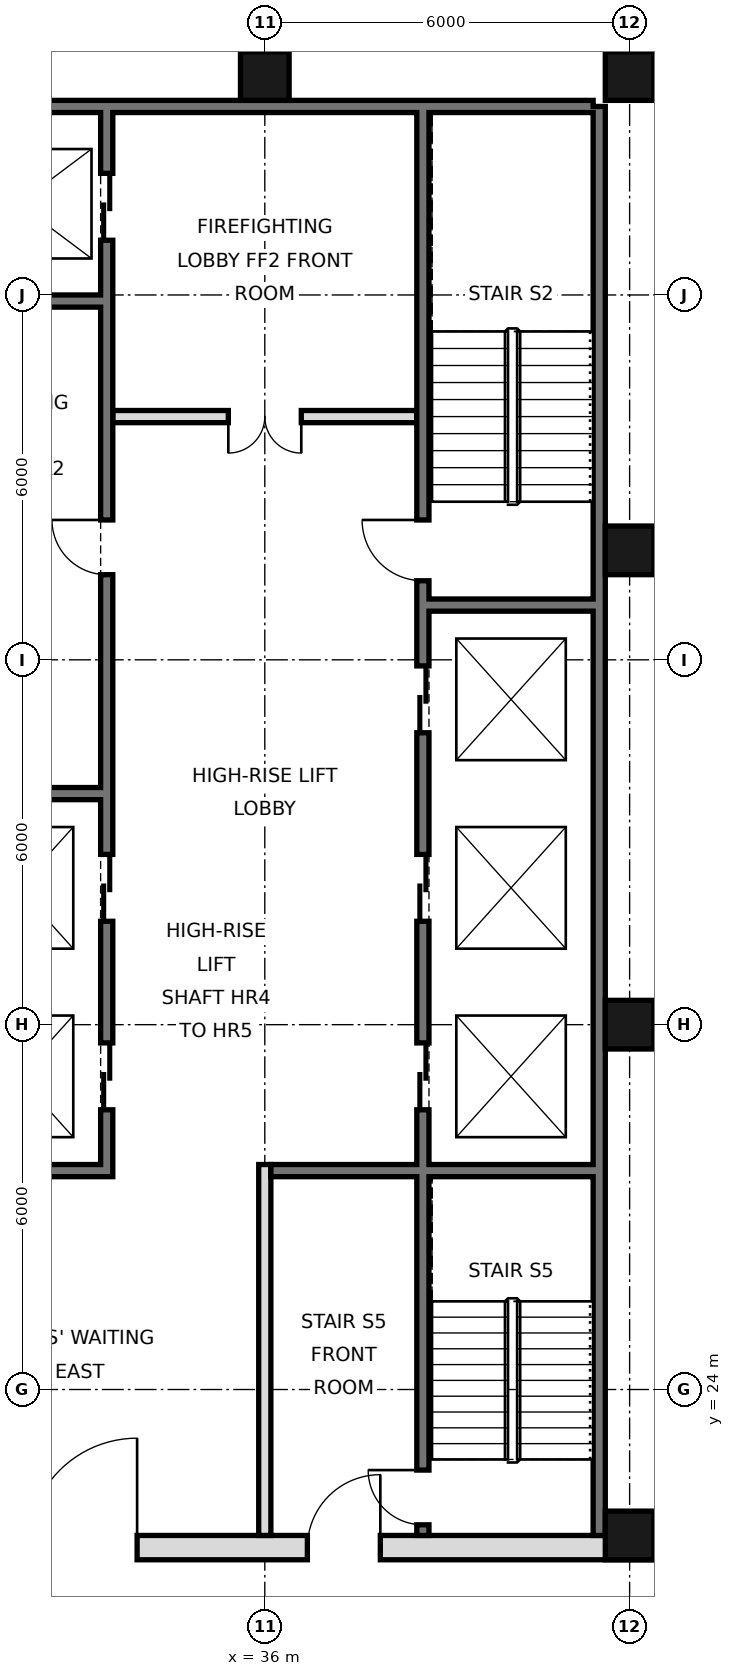
"""IFC4 building model, lengths in metres.
Left out: names, types, materials, properties, quantities, classifications, styles, units other than length and angle.
Written with IfcOpenShell. Run it as: python <this file> out.ifc"""

import sys

from ifc_helpers import new_model, si_unit, direction, frame, frame_2d, origin, origin_2d, place, context, subcontext, project, spatial, rectangle, hollow_rectangle, extrude, element, fill, save


model = new_model("IFC4")
c1 = context("Model", 3, precision=1e-05, world=origin(), true_north=direction((0.0, 1.0)))
c2 = subcontext(c1, "Body", "Model", "MODEL_VIEW")
j1 = project(units=[si_unit("LENGTHUNIT", "METRE"), si_unit("PLANEANGLEUNIT", "RADIAN")], contexts=[c1])
p1 = place(None, origin())
s1 = spatial("IfcSite", under=j1, at=p1, CompositionType="ELEMENT")
p2 = place(p1, origin())
s2 = spatial("IfcBuilding", under=s1, at=p2, CompositionType="ELEMENT")
p3 = place(p2, frame((0.0, 0.0, 266.6)))
s3 = spatial("IfcBuildingStorey", under=s2, at=p3, CompositionType="ELEMENT", Elevation=266.6)
for number, where, z_axis, x_axis in (
    (1, (36.0, 45.6, 0.0), (0.0, 0.0, 1.0), (1.0, 0.0, 0.0)),
    (2, (42.0, 21.6, 0.0), (0.0, 0.0, 1.0), (1.0, 0.0, 0.0)),
    (3, (42.0, 30.0, 0.0), (0.0, 0.0, 1.0), (1.0, 0.0, 0.0)),
    (4, (42.0, 37.8, 0.0), (0.0, 0.0, 1.0), (1.0, 0.0, 0.0)),
    (5, (42.0, 45.6, 0.0), (0.0, 0.0, 1.0), (1.0, 0.0, 0.0)),
):
    element("IfcColumn", number, at=place(p3, frame(where, z_axis=z_axis, x_axis=x_axis)), inside=s3, PredefinedType="COLUMN", context=c2, shape_type="SweptSolid", body=[
        extrude(hollow_rectangle(XDim=0.8, YDim=0.8, WallThickness=0.032, at=origin_2d()), origin(), (0.0, 0.0, 1.0), 3.6),
    ])
p4 = place(p3, frame((41.5, 21.6, 0.0), z_axis=(0.0, 0.0, 1.0), x_axis=(0.0, 1.0, 0.0)))
e6 = element("IfcWall", 6, at=p4, inside=s3, PredefinedType="SOLIDWALL", context=c2, shape_type="SweptSolid", body=[
    extrude(rectangle(XDim=23.5, YDim=0.2, at=frame_2d((11.75, 0.0))), origin(), (0.0, 0.0, 1.0), 3.42),
])
p5 = place(p3, frame((6.6, 45.1, 0.0), z_axis=(0.0, 0.0, 1.0), x_axis=(1.0, 0.0, 0.0)))
e7 = element("IfcWall", 7, at=p5, inside=s3, PredefinedType="SOLIDWALL", context=c2, shape_type="SweptSolid", body=[
    extrude(rectangle(XDim=34.8, YDim=0.2, at=frame_2d((17.4, 0.0))), origin(), (0.0, 0.0, 1.0), 3.42),
])
p6 = place(p3, frame((5.6, 21.4, 0.0), z_axis=(0.0, 0.0, 1.0), x_axis=(1.0, 0.0, 0.0)))
e8 = element("IfcWall", 8, at=p6, inside=s3, PredefinedType="SOLIDWALL", context=c2, shape_type="SweptSolid", body=[
    extrude(rectangle(XDim=36.8, YDim=0.4, at=frame_2d((18.4, 0.0))), origin(), (0.0, 0.0, 1.0), 3.42),
])
p7 = place(p6, frame((8.5, 0.0, 0.0)))
e9 = element("IfcOpeningElement", 9, at=p7, cuts=e8, PredefinedType="OPENING", context=c2, shape_type="SweptSolid", body=[
    extrude(rectangle(XDim=1.8, YDim=2.1, at=frame_2d((0.9, 1.05))), frame((0.0, 0.21, 0.0), z_axis=(0.0, -1.0, 0.0), x_axis=(1.0, 0.0, 0.0)), (0.0, 0.0, 1.0), 0.42),
])
p8 = place(p6, frame((17.5, 0.0, 0.0)))
e10 = element("IfcOpeningElement", 10, at=p8, cuts=e8, PredefinedType="OPENING", context=c2, shape_type="SweptSolid", body=[
    extrude(rectangle(XDim=1.8, YDim=2.1, at=frame_2d((0.9, 1.05))), frame((0.0, 0.21, 0.0), z_axis=(0.0, -1.0, 0.0), x_axis=(1.0, 0.0, 0.0)), (0.0, 0.0, 1.0), 0.42),
])
p9 = place(p6, frame((26.5, 0.0, 0.0)))
e11 = element("IfcOpeningElement", 11, at=p9, cuts=e8, PredefinedType="OPENING", context=c2, shape_type="SweptSolid", body=[
    extrude(rectangle(XDim=1.8, YDim=2.1, at=frame_2d((0.9, 1.05))), frame((0.0, 0.21, 0.0), z_axis=(0.0, -1.0, 0.0), x_axis=(1.0, 0.0, 0.0)), (0.0, 0.0, 1.0), 0.42),
])
p10 = place(p6, frame((4.5, 0.0, 0.0)))
e12 = element("IfcOpeningElement", 12, at=p10, cuts=e8, PredefinedType="OPENING", context=c2, shape_type="SweptSolid", body=[
    extrude(rectangle(XDim=1.2, YDim=2.1, at=frame_2d((0.6, 1.05))), frame((0.0, 0.21, 0.0), z_axis=(0.0, -1.0, 0.0), x_axis=(1.0, 0.0, 0.0)), (0.0, 0.0, 1.0), 0.42),
])
p11 = place(p6, frame((31.1, 0.0, 0.0)))
e13 = element("IfcOpeningElement", 13, at=p11, cuts=e8, PredefinedType="OPENING", context=c2, shape_type="SweptSolid", body=[
    extrude(rectangle(XDim=1.2, YDim=2.1, at=frame_2d((0.6, 1.05))), frame((0.0, 0.21, 0.0), z_axis=(0.0, -1.0, 0.0), x_axis=(1.0, 0.0, 0.0)), (0.0, 0.0, 1.0), 0.42),
])
p12 = place(p3, frame((33.4, 27.5, 0.0), z_axis=(0.0, 0.0, 1.0), x_axis=(0.0, 1.0, 0.0)))
e14 = element("IfcWall", 14, at=p12, inside=s3, PredefinedType="SOLIDWALL", context=c2, shape_type="SweptSolid", body=[
    extrude(rectangle(XDim=17.5, YDim=0.2, at=frame_2d((8.75, 0.0))), origin(), (0.0, 0.0, 1.0), 3.42),
])
p13 = place(p12, frame((1.1, 0.0, 0.0)))
e15 = element("IfcOpeningElement", 15, at=p13, cuts=e14, PredefinedType="OPENING", context=c2, shape_type="SweptSolid", body=[
    extrude(rectangle(XDim=1.1, YDim=2.1, at=frame_2d((0.55, 1.05))), frame((0.0, 0.11, 0.0), z_axis=(0.0, -1.0, 0.0), x_axis=(1.0, 0.0, 0.0)), (0.0, 0.0, 1.0), 0.22),
])
p14 = place(p12, frame((4.2, 0.0, 0.0)))
e16 = element("IfcOpeningElement", 16, at=p14, cuts=e14, PredefinedType="OPENING", context=c2, shape_type="SweptSolid", body=[
    extrude(rectangle(XDim=1.1, YDim=2.1, at=frame_2d((0.55, 1.05))), frame((0.0, 0.11, 0.0), z_axis=(0.0, -1.0, 0.0), x_axis=(1.0, 0.0, 0.0)), (0.0, 0.0, 1.0), 0.22),
])
p15 = place(p12, frame((15.4, 0.0, 0.0)))
e17 = element("IfcOpeningElement", 17, at=p15, cuts=e14, PredefinedType="OPENING", context=c2, shape_type="SweptSolid", body=[
    extrude(rectangle(XDim=1.1, YDim=2.1, at=frame_2d((0.55, 1.05))), frame((0.0, 0.11, 0.0), z_axis=(0.0, -1.0, 0.0), x_axis=(1.0, 0.0, 0.0)), (0.0, 0.0, 1.0), 0.22),
])
p16 = place(p12, frame((9.9, 0.0, 0.0)))
e18 = element("IfcOpeningElement", 18, at=p16, cuts=e14, PredefinedType="OPENING", context=c2, shape_type="SweptSolid", body=[
    extrude(rectangle(XDim=0.9, YDim=2.1, at=frame_2d((0.45, 1.05))), frame((0.0, 0.11, 0.0), z_axis=(0.0, -1.0, 0.0), x_axis=(1.0, 0.0, 0.0)), (0.0, 0.0, 1.0), 0.22),
])
p17 = place(p3, frame((36.0, 21.6, 0.0), z_axis=(0.0, 0.0, 1.0), x_axis=(0.0, 1.0, 0.0)))
e19 = element("IfcWall", 19, at=p17, inside=s3, PredefinedType="PARTITIONING", context=c2, shape_type="SweptSolid", body=[
    extrude(rectangle(XDim=6.1, YDim=0.2, at=frame_2d((3.05, 0.0))), origin(), (0.0, 0.0, 1.0), 3.42),
])
p18 = place(p3, frame((38.6, 21.6, 0.0), z_axis=(0.0, 0.0, 1.0), x_axis=(0.0, 1.0, 0.0)))
e20 = element("IfcWall", 20, at=p18, inside=s3, PredefinedType="SOLIDWALL", context=c2, shape_type="SweptSolid", body=[
    extrude(rectangle(XDim=23.4, YDim=0.2, at=frame_2d((11.7, 0.0))), origin(), (0.0, 0.0, 1.0), 3.42),
])
p19 = place(p18, frame((7.0, 0.0, 0.0)))
e21 = element("IfcOpeningElement", 21, at=p19, cuts=e20, PredefinedType="OPENING", context=c2, shape_type="SweptSolid", body=[
    extrude(rectangle(XDim=1.1, YDim=2.1, at=frame_2d((0.55, 1.05))), frame((0.0, 0.11, 0.0), z_axis=(0.0, -1.0, 0.0), x_axis=(1.0, 0.0, 0.0)), (0.0, 0.0, 1.0), 0.22),
])
p20 = place(p18, frame((10.1, 0.0, 0.0)))
e22 = element("IfcOpeningElement", 22, at=p20, cuts=e20, PredefinedType="OPENING", context=c2, shape_type="SweptSolid", body=[
    extrude(rectangle(XDim=1.1, YDim=2.1, at=frame_2d((0.55, 1.05))), frame((0.0, 0.11, 0.0), z_axis=(0.0, -1.0, 0.0), x_axis=(1.0, 0.0, 0.0)), (0.0, 0.0, 1.0), 0.22),
])
p21 = place(p18, frame((13.2, 0.0, 0.0)))
e23 = element("IfcOpeningElement", 23, at=p21, cuts=e20, PredefinedType="OPENING", context=c2, shape_type="SweptSolid", body=[
    extrude(rectangle(XDim=1.1, YDim=2.1, at=frame_2d((0.55, 1.05))), frame((0.0, 0.11, 0.0), z_axis=(0.0, -1.0, 0.0), x_axis=(1.0, 0.0, 0.0)), (0.0, 0.0, 1.0), 0.22),
])
p22 = place(p18, frame((15.7, 0.0, 0.0)))
e24 = element("IfcOpeningElement", 24, at=p22, cuts=e20, PredefinedType="OPENING", context=c2, shape_type="SweptSolid", body=[
    extrude(rectangle(XDim=1.0, YDim=2.1, at=frame_2d((0.5, 1.05))), frame((0.0, 0.11, 0.0), z_axis=(0.0, -1.0, 0.0), x_axis=(1.0, 0.0, 0.0)), (0.0, 0.0, 1.0), 0.22),
])
p23 = place(p18, frame((0.175, 0.0, 0.0)))
e25 = element("IfcOpeningElement", 25, at=p23, cuts=e20, PredefinedType="OPENING", context=c2, shape_type="SweptSolid", body=[
    extrude(rectangle(XDim=0.9, YDim=2.1, at=frame_2d((0.45, 1.05))), frame((0.0, 0.11, 0.0), z_axis=(0.0, -1.0, 0.0), x_axis=(1.0, 0.0, 0.0)), (0.0, 0.0, 1.0), 0.22),
])
p24 = place(p3, frame((30.6, 27.6, 0.0), z_axis=(0.0, 0.0, 1.0), x_axis=(1.0, 0.0, 0.0)))
e26 = element("IfcWall", 26, at=p24, inside=s3, PredefinedType="SOLIDWALL", context=c2, shape_type="SweptSolid", body=[
    extrude(rectangle(XDim=2.7, YDim=0.2, at=frame_2d((1.35, 0.0))), origin(), (0.0, 0.0, 1.0), 3.42),
])
p25 = place(p3, frame((36.1, 27.6, 0.0), z_axis=(0.0, 0.0, 1.0), x_axis=(1.0, 0.0, 0.0)))
e27 = element("IfcWall", 27, at=p25, inside=s3, PredefinedType="SOLIDWALL", context=c2, shape_type="SweptSolid", body=[
    extrude(rectangle(XDim=5.3, YDim=0.2, at=frame_2d((2.65, 0.0))), origin(), (0.0, 0.0, 1.0), 3.42),
])
for number, where, z_axis, x_axis in (
    (28, (30.6, 33.8, 0.0), (0.0, 0.0, 1.0), (1.0, 0.0, 0.0)),
    (29, (38.7, 36.9, 0.0), (0.0, 0.0, 1.0), (1.0, 0.0, 0.0)),
):
    element("IfcWall", number, at=place(p3, frame(where, z_axis=z_axis, x_axis=x_axis)), inside=s3, PredefinedType="SOLIDWALL", context=c2, shape_type="SweptSolid", body=[
        extrude(rectangle(XDim=2.7, YDim=0.2, at=frame_2d((1.35, 0.0))), origin(), (0.0, 0.0, 1.0), 3.42),
    ])
p26 = place(p3, frame((33.5, 40.0, 0.0), z_axis=(0.0, 0.0, 1.0), x_axis=(1.0, 0.0, 0.0)))
e30 = element("IfcWall", 30, at=p26, inside=s3, PredefinedType="PARTITIONING", context=c2, shape_type="SweptSolid", body=[
    extrude(rectangle(XDim=5.0, YDim=0.2, at=frame_2d((2.5, 0.0))), origin(), (0.0, 0.0, 1.0), 3.42),
])
p27 = place(p26, frame((1.9, 0.0, 0.0)))
e31 = element("IfcOpeningElement", 31, at=p27, cuts=e30, PredefinedType="OPENING", context=c2, shape_type="SweptSolid", body=[
    extrude(rectangle(XDim=1.2, YDim=2.1, at=frame_2d((0.6, 1.05))), frame((0.0, 0.11, 0.0), z_axis=(0.0, -1.0, 0.0), x_axis=(1.0, 0.0, 0.0)), (0.0, 0.0, 1.0), 0.22),
])
p28 = place(p3, frame((30.6, 41.9, 0.0), z_axis=(0.0, 0.0, 1.0), x_axis=(1.0, 0.0, 0.0)))
e32 = element("IfcWall", 32, at=p28, inside=s3, PredefinedType="SOLIDWALL", context=c2, shape_type="SweptSolid", body=[
    extrude(rectangle(XDim=2.7, YDim=0.2, at=frame_2d((1.35, 0.0))), origin(), (0.0, 0.0, 1.0), 3.42),
])
p29 = place(p9, frame((1.8, 0.0, 0.0), z_axis=(0.0, 0.0, 1.0), x_axis=(-1.0, 0.0, 0.0)))
e33 = element("IfcDoor", 33, at=p29, inside=s3, OperationType="SINGLE_SWING_LEFT", PredefinedType="DOOR", context=c2, shape_type="SweptSolid", body=[
    extrude(rectangle(XDim=1.8, YDim=2.1, at=frame_2d((0.9, 1.05))), frame((0.0, 0.025, 0.0), z_axis=(0.0, -1.0, 0.0), x_axis=(1.0, 0.0, 0.0)), (0.0, 0.0, 1.0), 0.05),
])
fill(e11, e33)
p30 = place(p11, frame((1.2, 0.0, 0.0), z_axis=(0.0, 0.0, 1.0), x_axis=(-1.0, 0.0, 0.0)))
e34 = element("IfcDoor", 34, at=p30, inside=s3, OperationType="SINGLE_SWING_LEFT", PredefinedType="DOOR", context=c2, shape_type="SweptSolid", body=[
    extrude(rectangle(XDim=1.2, YDim=2.1, at=frame_2d((0.6, 1.05))), frame((0.0, 0.025, 0.0), z_axis=(0.0, -1.0, 0.0), x_axis=(1.0, 0.0, 0.0)), (0.0, 0.0, 1.0), 0.05),
])
fill(e13, e34)
p31 = place(p27, frame((1.2, 0.0, 0.0), z_axis=(0.0, 0.0, 1.0), x_axis=(-1.0, 0.0, 0.0)))
e35 = element("IfcDoor", 35, at=p31, inside=s3, OperationType="DOUBLE_DOOR_SINGLE_SWING", PredefinedType="DOOR", context=c2, shape_type="SweptSolid", body=[
    extrude(rectangle(XDim=1.2, YDim=2.1, at=frame_2d((0.6, 1.05))), frame((0.0, 0.025, 0.0), z_axis=(0.0, -1.0, 0.0), x_axis=(1.0, 0.0, 0.0)), (0.0, 0.0, 1.0), 0.05),
])
fill(e31, e35)
p32 = place(p19, origin())
e36 = element("IfcDoor", 36, at=p32, inside=s3, OperationType="DOUBLE_DOOR_SLIDING", PredefinedType="DOOR", context=c2, shape_type="SweptSolid", body=[
    extrude(rectangle(XDim=1.1, YDim=2.1, at=frame_2d((0.55, 1.05))), frame((0.0, 0.025, 0.0), z_axis=(0.0, -1.0, 0.0), x_axis=(1.0, 0.0, 0.0)), (0.0, 0.0, 1.0), 0.05),
])
fill(e21, e36)
p33 = place(p20, origin())
e37 = element("IfcDoor", 37, at=p33, inside=s3, OperationType="DOUBLE_DOOR_SLIDING", PredefinedType="DOOR", context=c2, shape_type="SweptSolid", body=[
    extrude(rectangle(XDim=1.1, YDim=2.1, at=frame_2d((0.55, 1.05))), frame((0.0, 0.025, 0.0), z_axis=(0.0, -1.0, 0.0), x_axis=(1.0, 0.0, 0.0)), (0.0, 0.0, 1.0), 0.05),
])
fill(e22, e37)
p34 = place(p21, origin())
e38 = element("IfcDoor", 38, at=p34, inside=s3, OperationType="DOUBLE_DOOR_SLIDING", PredefinedType="DOOR", context=c2, shape_type="SweptSolid", body=[
    extrude(rectangle(XDim=1.1, YDim=2.1, at=frame_2d((0.55, 1.05))), frame((0.0, 0.025, 0.0), z_axis=(0.0, -1.0, 0.0), x_axis=(1.0, 0.0, 0.0)), (0.0, 0.0, 1.0), 0.05),
])
fill(e23, e38)
p35 = place(p13, origin())
e39 = element("IfcDoor", 39, at=p35, inside=s3, OperationType="DOUBLE_DOOR_SLIDING", PredefinedType="DOOR", context=c2, shape_type="SweptSolid", body=[
    extrude(rectangle(XDim=1.1, YDim=2.1, at=frame_2d((0.55, 1.05))), frame((0.0, 0.025, 0.0), z_axis=(0.0, -1.0, 0.0), x_axis=(1.0, 0.0, 0.0)), (0.0, 0.0, 1.0), 0.05),
])
fill(e15, e39)
p36 = place(p14, origin())
e40 = element("IfcDoor", 40, at=p36, inside=s3, OperationType="DOUBLE_DOOR_SLIDING", PredefinedType="DOOR", context=c2, shape_type="SweptSolid", body=[
    extrude(rectangle(XDim=1.1, YDim=2.1, at=frame_2d((0.55, 1.05))), frame((0.0, 0.025, 0.0), z_axis=(0.0, -1.0, 0.0), x_axis=(1.0, 0.0, 0.0)), (0.0, 0.0, 1.0), 0.05),
])
fill(e16, e40)
p37 = place(p15, origin())
e41 = element("IfcDoor", 41, at=p37, inside=s3, OperationType="DOUBLE_DOOR_SLIDING", PredefinedType="DOOR", context=c2, shape_type="SweptSolid", body=[
    extrude(rectangle(XDim=1.1, YDim=2.1, at=frame_2d((0.55, 1.05))), frame((0.0, 0.025, 0.0), z_axis=(0.0, -1.0, 0.0), x_axis=(1.0, 0.0, 0.0)), (0.0, 0.0, 1.0), 0.05),
])
fill(e17, e41)
p38 = place(p22, frame((1.0, 0.0, 0.0), z_axis=(0.0, 0.0, 1.0), x_axis=(-1.0, 0.0, 0.0)))
e42 = element("IfcDoor", 42, at=p38, inside=s3, OperationType="SINGLE_SWING_LEFT", PredefinedType="DOOR", context=c2, shape_type="SweptSolid", body=[
    extrude(rectangle(XDim=1.0, YDim=2.1, at=frame_2d((0.5, 1.05))), frame((0.0, 0.025, 0.0), z_axis=(0.0, -1.0, 0.0), x_axis=(1.0, 0.0, 0.0)), (0.0, 0.0, 1.0), 0.05),
])
fill(e24, e42)
p39 = place(p23, frame((0.9, 0.0, 0.0), z_axis=(0.0, 0.0, 1.0), x_axis=(-1.0, 0.0, 0.0)))
e43 = element("IfcDoor", 43, at=p39, inside=s3, OperationType="SINGLE_SWING_LEFT", PredefinedType="DOOR", context=c2, shape_type="SweptSolid", body=[
    extrude(rectangle(XDim=0.9, YDim=2.1, at=frame_2d((0.45, 1.05))), frame((0.0, 0.025, 0.0), z_axis=(0.0, -1.0, 0.0), x_axis=(1.0, 0.0, 0.0)), (0.0, 0.0, 1.0), 0.05),
])
fill(e25, e43)
p40 = place(p16, frame((0.9, 0.0, 0.0), z_axis=(0.0, 0.0, 1.0), x_axis=(-1.0, 0.0, 0.0)))
e44 = element("IfcDoor", 44, at=p40, inside=s3, OperationType="SINGLE_SWING_LEFT", PredefinedType="DOOR", context=c2, shape_type="SweptSolid", body=[
    extrude(rectangle(XDim=0.9, YDim=2.1, at=frame_2d((0.45, 1.05))), frame((0.0, 0.025, 0.0), z_axis=(0.0, -1.0, 0.0), x_axis=(1.0, 0.0, 0.0)), (0.0, 0.0, 1.0), 0.05),
])
fill(e18, e44)
save(model, sys.argv[1])
